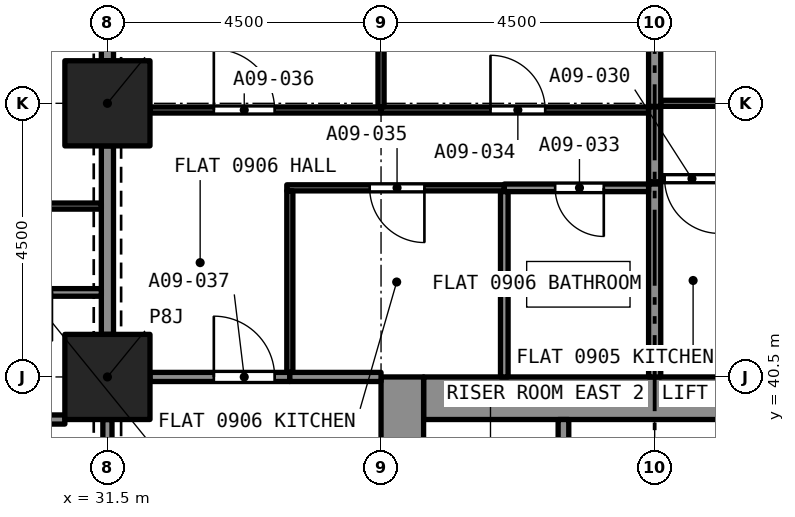
"""IFC4 building model, lengths in metres.
Left out: names, types, materials, properties, quantities, classifications, styles, units other than length and angle.
Written with IfcOpenShell. Run it as: python <this file> out.ifc"""

import sys

from ifc_helpers import new_model, si_unit, direction, frame, frame_2d, origin, origin_2d, place, context, subcontext, project, spatial, rectangle, extrude, element, fill, save


model = new_model("IFC4")
c1 = context("Model", 3, precision=1e-05, world=origin(), true_north=direction((0.0, 1.0)))
c2 = subcontext(c1, "Body", "Model", "MODEL_VIEW")
j1 = project(units=[si_unit("LENGTHUNIT", "METRE"), si_unit("PLANEANGLEUNIT", "RADIAN")], contexts=[c1])
p1 = place(None, origin())
s1 = spatial("IfcSite", under=j1, at=p1, CompositionType="ELEMENT")
p2 = place(p1, origin())
s2 = spatial("IfcBuilding", under=s1, at=p2, CompositionType="ELEMENT")
p3 = place(p2, frame((0.0, 0.0, 40.0)))
s3 = spatial("IfcBuildingStorey", under=s2, at=p3, CompositionType="ELEMENT", Elevation=40.0)
for number, where, z_axis, x_axis in (
    (1, (31.5, 40.5, 0.0), (0.0, 0.0, 1.0), (1.0, 0.0, 0.0)),
    (2, (31.5, 45.0, 0.0), (0.0, 0.0, 1.0), (1.0, 0.0, 0.0)),
):
    element("IfcColumn", number, at=place(p3, frame(where, z_axis=z_axis, x_axis=x_axis)), inside=s3, PredefinedType="COLUMN", context=c2, shape_type="SweptSolid", body=[
        extrude(rectangle(XDim=1.4, YDim=1.4, at=origin_2d()), origin(), (0.0, 0.0, 1.0), 3.2),
    ])
p4 = place(p3, frame((36.7, 40.15, 0.0), z_axis=(0.0, 0.0, 1.0), x_axis=(1.0, 0.0, 0.0)))
e3 = element("IfcWall", 3, at=p4, inside=s3, PredefinedType="SOLIDWALL", context=c2, shape_type="SweptSolid", body=[
    extrude(rectangle(XDim=7.6, YDim=0.7, at=frame_2d((3.8, 0.0))), origin(), (0.0, 0.0, 1.0), 3.2),
])
p5 = place(p3, frame((36.35, 27.0, 0.0), z_axis=(0.0, 0.0, 1.0), x_axis=(0.0, 1.0, 0.0)))
e4 = element("IfcWall", 4, at=p5, inside=s3, PredefinedType="SOLIDWALL", context=c2, shape_type="SweptSolid", body=[
    extrude(rectangle(XDim=13.5, YDim=0.7, at=frame_2d((6.75, 0.0))), origin(), (0.0, 0.0, 1.0), 3.2),
])
p6 = place(p5, frame((8.95, 0.0, 0.0)))
e5 = element("IfcOpeningElement", 5, at=p6, cuts=e4, PredefinedType="OPENING", context=c2, shape_type="SweptSolid", body=[
    extrude(rectangle(XDim=1.2, YDim=2.1, at=frame_2d((0.6, 1.05))), frame((0.0, 0.36, 0.0), z_axis=(0.0, -1.0, 0.0), x_axis=(1.0, 0.0, 0.0)), (0.0, 0.0, 1.0), 0.72),
])
p7 = place(p3, frame((40.6, 45.0, 0.0), z_axis=(0.0, 0.0, 1.0), x_axis=(1.0, 0.0, 0.0)))
e6 = element("IfcWall", 6, at=p7, inside=s3, PredefinedType="PARTITIONING", context=c2, shape_type="SweptSolid", body=[
    extrude(rectangle(XDim=4.4, YDim=0.1, at=frame_2d((2.2, 0.0))), origin(), (0.0, 0.0, 1.0), 2.9),
])
p8 = place(p7, frame((1.7, 0.0, 0.0)))
e7 = element("IfcOpeningElement", 7, at=p8, cuts=e6, PredefinedType="OPENING", context=c2, shape_type="SweptSolid", body=[
    extrude(rectangle(XDim=0.9, YDim=2.1, at=frame_2d((0.45, 1.05))), frame((0.0, 0.06, 0.0), z_axis=(0.0, -1.0, 0.0), x_axis=(1.0, 0.0, 0.0)), (0.0, 0.0, 1.0), 0.12),
])
p9 = place(p3, frame((40.5, 44.95, 0.0), z_axis=(0.0, 0.0, 1.0), x_axis=(0.0, 1.0, 0.0)))
e8 = element("IfcWall", 8, at=p9, inside=s3, PredefinedType="PARTITIONING", context=c2, shape_type="SweptSolid", body=[
    extrude(rectangle(XDim=3.85, YDim=0.2, at=frame_2d((1.925, 0.0))), origin(), (0.0, 0.0, 1.0), 2.9),
])
p10 = place(p3, frame((41.727, 43.76, 0.0), z_axis=(0.0, 0.0, 1.0), x_axis=(-1.0, 0.0, 0.0)))
e9 = element("IfcWall", 9, at=p10, inside=s3, PredefinedType="PARTITIONING", context=c2, shape_type="SweptSolid", body=[
    extrude(rectangle(XDim=1.127, YDim=0.1, at=frame_2d((0.563, 0.0))), origin(), (0.0, 0.0, 1.0), 2.9),
])
p11 = place(p10, frame((0.164, 0.0, 0.0)))
e10 = element("IfcOpeningElement", 10, at=p11, cuts=e9, PredefinedType="OPENING", context=c2, shape_type="SweptSolid", body=[
    extrude(rectangle(XDim=0.9, YDim=2.1, at=frame_2d((0.45, 1.05))), frame((0.0, 0.06, 0.0), z_axis=(0.0, -1.0, 0.0), x_axis=(1.0, 0.0, 0.0)), (0.0, 0.0, 1.0), 0.12),
])
p12 = place(p3, frame((40.5, 43.71, 0.0), z_axis=(0.0, 0.0, 1.0), x_axis=(0.0, 1.0, 0.0)))
e11 = element("IfcWall", 11, at=p12, inside=s3, PredefinedType="PARTITIONING", context=c2, shape_type="SweptSolid", body=[
    extrude(rectangle(XDim=1.23, YDim=0.2, at=frame_2d((0.615, 0.0))), origin(), (0.0, 0.0, 1.0), 2.9),
])
p13 = place(p3, frame((40.5, 40.5, 0.0), z_axis=(0.0, 0.0, 1.0), x_axis=(0.0, 1.0, 0.0)))
e12 = element("IfcWall", 12, at=p13, inside=s3, PredefinedType="PARTITIONING", context=c2, shape_type="SweptSolid", body=[
    extrude(rectangle(XDim=3.173, YDim=0.2, at=frame_2d((1.586, 0.0))), origin(), (0.0, 0.0, 1.0), 2.9),
])
p14 = place(p3, frame((40.4, 43.61, 0.0), z_axis=(0.0, 0.0, 1.0), x_axis=(-1.0, 0.0, 0.0)))
e13 = element("IfcWall", 13, at=p14, inside=s3, PredefinedType="PARTITIONING", context=c2, shape_type="SweptSolid", body=[
    extrude(rectangle(XDim=2.373, YDim=0.125, at=frame_2d((1.187, 0.0))), origin(), (0.0, 0.0, 1.0), 2.9),
])
p15 = place(p14, frame((0.737, 0.0, 0.0)))
e14 = element("IfcOpeningElement", 14, at=p15, cuts=e13, PredefinedType="OPENING", context=c2, shape_type="SweptSolid", body=[
    extrude(rectangle(XDim=0.8, YDim=2.1, at=frame_2d((0.4, 1.05))), frame((0.0, 0.073, 0.0), z_axis=(0.0, -1.0, 0.0), x_axis=(1.0, 0.0, 0.0)), (0.0, 0.0, 1.0), 0.145),
])
p16 = place(p3, frame((38.027, 40.5, 0.0), z_axis=(0.0, 0.0, 1.0), x_axis=(0.0, 1.0, 0.0)))
e15 = element("IfcWall", 15, at=p16, inside=s3, PredefinedType="PARTITIONING", context=c2, shape_type="SweptSolid", body=[
    extrude(rectangle(XDim=3.048, YDim=0.125, at=frame_2d((1.524, 0.0))), origin(), (0.0, 0.0, 1.0), 2.9),
])
p17 = place(p3, frame((36.0, 44.89, 0.0), z_axis=(0.0, 0.0, 1.0), x_axis=(1.0, 0.0, 0.0)))
e16 = element("IfcWall", 16, at=p17, inside=s3, PredefinedType="PARTITIONING", context=c2, shape_type="SweptSolid", body=[
    extrude(rectangle(XDim=4.4, YDim=0.1, at=frame_2d((2.2, 0.0))), origin(), (0.0, 0.0, 1.0), 2.9),
])
p18 = place(p17, frame((1.8, 0.0, 0.0)))
e17 = element("IfcOpeningElement", 17, at=p18, cuts=e16, PredefinedType="OPENING", context=c2, shape_type="SweptSolid", body=[
    extrude(rectangle(XDim=0.9, YDim=2.1, at=frame_2d((0.45, 1.05))), frame((0.0, 0.06, 0.0), z_axis=(0.0, -1.0, 0.0), x_axis=(1.0, 0.0, 0.0)), (0.0, 0.0, 1.0), 0.12),
])
p19 = place(p3, frame((36.0, 44.94, 0.0), z_axis=(0.0, 0.0, 1.0), x_axis=(0.0, 1.0, 0.0)))
e18 = element("IfcWall", 18, at=p19, inside=s3, PredefinedType="PARTITIONING", context=c2, shape_type="SweptSolid", body=[
    extrude(rectangle(XDim=3.86, YDim=0.1, at=frame_2d((1.93, 0.0))), origin(), (0.0, 0.0, 1.0), 2.9),
])
p20 = place(p3, frame((38.027, 43.61, 0.0), z_axis=(0.0, 0.0, 1.0), x_axis=(-1.0, 0.0, 0.0)))
e19 = element("IfcWall", 19, at=p20, inside=s3, PredefinedType="PARTITIONING", context=c2, shape_type="SweptSolid", body=[
    extrude(rectangle(XDim=3.577, YDim=0.1, at=frame_2d((1.788, 0.0))), origin(), (0.0, 0.0, 1.0), 2.9),
])
p21 = place(p20, frame((1.313, 0.0, 0.0)))
e20 = element("IfcOpeningElement", 20, at=p21, cuts=e19, PredefinedType="OPENING", context=c2, shape_type="SweptSolid", body=[
    extrude(rectangle(XDim=0.9, YDim=2.1, at=frame_2d((0.45, 1.05))), frame((0.0, 0.06, 0.0), z_axis=(0.0, -1.0, 0.0), x_axis=(1.0, 0.0, 0.0)), (0.0, 0.0, 1.0), 0.12),
])
p22 = place(p3, frame((34.5, 40.575, 0.0), z_axis=(0.0, 0.0, 1.0), x_axis=(0.0, 1.0, 0.0)))
e21 = element("IfcWall", 21, at=p22, inside=s3, PredefinedType="PARTITIONING", context=c2, shape_type="SweptSolid", body=[
    extrude(rectangle(XDim=2.985, YDim=0.1, at=frame_2d((1.493, 0.0))), origin(), (0.0, 0.0, 1.0), 2.9),
])
p23 = place(p3, frame((32.2, 44.89, 0.0), z_axis=(0.0, 0.0, 1.0), x_axis=(1.0, 0.0, 0.0)))
e22 = element("IfcWall", 22, at=p23, inside=s3, PredefinedType="PARTITIONING", context=c2, shape_type="SweptSolid", body=[
    extrude(rectangle(XDim=3.8, YDim=0.1, at=frame_2d((1.9, 0.0))), origin(), (0.0, 0.0, 1.0), 2.9),
])
p24 = place(p23, frame((1.05, 0.0, 0.0)))
e23 = element("IfcOpeningElement", 23, at=p24, cuts=e22, PredefinedType="OPENING", context=c2, shape_type="SweptSolid", body=[
    extrude(rectangle(XDim=1.0, YDim=2.1, at=frame_2d((0.5, 1.05))), frame((0.0, 0.06, 0.0), z_axis=(0.0, -1.0, 0.0), x_axis=(1.0, 0.0, 0.0)), (0.0, 0.0, 1.0), 0.12),
])
p25 = place(p3, frame((31.5, 41.2, 0.0), z_axis=(0.0, 0.0, 1.0), x_axis=(0.0, 1.0, 0.0)))
e24 = element("IfcWall", 24, at=p25, inside=s3, PredefinedType="PARTITIONING", context=c2, shape_type="SweptSolid", body=[
    extrude(rectangle(XDim=3.1, YDim=0.2, at=frame_2d((1.55, 0.0))), origin(), (0.0, 0.0, 1.0), 2.38),
])
p26 = place(p3, frame((32.2, 40.5, 0.0), z_axis=(0.0, 0.0, 1.0), x_axis=(1.0, 0.0, 0.0)))
e25 = element("IfcWall", 25, at=p26, inside=s3, PredefinedType="PARTITIONING", context=c2, shape_type="SweptSolid", body=[
    extrude(rectangle(XDim=2.3, YDim=0.15, at=frame_2d((1.15, 0.0))), origin(), (0.0, 0.0, 1.0), 2.9),
])
p27 = place(p26, frame((1.05, 0.0, 0.0)))
e26 = element("IfcOpeningElement", 26, at=p27, cuts=e25, PredefinedType="OPENING", context=c2, shape_type="SweptSolid", body=[
    extrude(rectangle(XDim=1.0, YDim=2.1, at=frame_2d((0.5, 1.05))), frame((0.0, 0.085, 0.0), z_axis=(0.0, -1.0, 0.0), x_axis=(1.0, 0.0, 0.0)), (0.0, 0.0, 1.0), 0.17),
])
p28 = place(p3, frame((34.5, 40.5, 0.0), z_axis=(0.0, 0.0, 1.0), x_axis=(1.0, 0.0, 0.0)))
e27 = element("IfcWall", 27, at=p28, inside=s3, PredefinedType="PARTITIONING", context=c2, shape_type="SweptSolid", body=[
    extrude(rectangle(XDim=1.5, YDim=0.15, at=frame_2d((0.75, 0.0))), origin(), (0.0, 0.0, 1.0), 2.9),
])
p29 = place(p3, frame((31.5, 45.7, 0.0), z_axis=(0.0, 0.0, 1.0), x_axis=(0.0, 1.0, 0.0)))
e28 = element("IfcWall", 28, at=p29, inside=s3, PredefinedType="PARTITIONING", context=c2, shape_type="SweptSolid", body=[
    extrude(rectangle(XDim=3.1, YDim=0.2, at=frame_2d((1.55, 0.0))), origin(), (0.0, 0.0, 1.0), 2.38),
])
p30 = place(p3, frame((31.4, 41.89, 0.0), z_axis=(0.0, 0.0, 1.0), x_axis=(-1.0, 0.0, 0.0)))
e29 = element("IfcWall", 29, at=p30, inside=s3, PredefinedType="PARTITIONING", context=c2, shape_type="SweptSolid", body=[
    extrude(rectangle(XDim=2.587, YDim=0.125, at=frame_2d((1.294, 0.0))), origin(), (0.0, 0.0, 1.0), 2.75),
])
p31 = place(p30, frame((0.812, 0.0, 0.0)))
e30 = element("IfcOpeningElement", 30, at=p31, cuts=e29, PredefinedType="OPENING", context=c2, shape_type="SweptSolid", body=[
    extrude(rectangle(XDim=0.8, YDim=2.1, at=frame_2d((0.4, 1.05))), frame((0.0, 0.073, 0.0), z_axis=(0.0, -1.0, 0.0), x_axis=(1.0, 0.0, 0.0)), (0.0, 0.0, 1.0), 0.145),
])
p32 = place(p3, frame((28.875, 39.8, 0.0), z_axis=(0.0, 0.0, 1.0), x_axis=(1.0, 0.0, 0.0)))
e31 = element("IfcWall", 31, at=p32, inside=s3, PredefinedType="PARTITIONING", context=c2, shape_type="SweptSolid", body=[
    extrude(rectangle(XDim=1.925, YDim=0.15, at=frame_2d((0.962, 0.0))), origin(), (0.0, 0.0, 1.0), 2.75),
])
p33 = place(p3, frame((27.0, 43.31, 0.0), z_axis=(0.0, 0.0, 1.0), x_axis=(1.0, 0.0, 0.0)))
e32 = element("IfcWall", 32, at=p33, inside=s3, PredefinedType="PARTITIONING", context=c2, shape_type="SweptSolid", body=[
    extrude(rectangle(XDim=4.4, YDim=0.1, at=frame_2d((2.2, 0.0))), origin(), (0.0, 0.0, 1.0), 2.75),
])
p34 = place(p33, frame((1.8, 0.0, 0.0)))
e33 = element("IfcOpeningElement", 33, at=p34, cuts=e32, PredefinedType="OPENING", context=c2, shape_type="SweptSolid", body=[
    extrude(rectangle(XDim=0.9, YDim=2.1, at=frame_2d((0.45, 1.05))), frame((0.0, 0.06, 0.0), z_axis=(0.0, -1.0, 0.0), x_axis=(1.0, 0.0, 0.0)), (0.0, 0.0, 1.0), 0.12),
])
p35 = place(p3, frame((31.5, 36.7, 0.0), z_axis=(0.0, 0.0, 1.0), x_axis=(0.0, 1.0, 0.0)))
e34 = element("IfcWall", 34, at=p35, inside=s3, PredefinedType="PARTITIONING", context=c2, shape_type="SweptSolid", body=[
    extrude(rectangle(XDim=3.1, YDim=0.15, at=frame_2d((1.55, 0.0))), origin(), (0.0, 0.0, 1.0), 2.38),
])
p36 = place(p35, frame((0.95, 0.0, 0.0)))
e35 = element("IfcOpeningElement", 35, at=p36, cuts=e34, PredefinedType="OPENING", context=c2, shape_type="SweptSolid", body=[
    extrude(rectangle(XDim=1.2, YDim=2.1, at=frame_2d((0.6, 1.05))), frame((0.0, 0.085, 0.0), z_axis=(0.0, -1.0, 0.0), x_axis=(1.0, 0.0, 0.0)), (0.0, 0.0, 1.0), 0.17),
])
p37 = place(p3, frame((39.0, 37.5, 0.0), z_axis=(0.0, 0.0, 1.0), x_axis=(0.0, 1.0, 0.0)))
e36 = element("IfcWall", 36, at=p37, inside=s3, PredefinedType="SOLIDWALL", context=c2, shape_type="SweptSolid", body=[
    extrude(rectangle(XDim=2.3, YDim=0.175, at=frame_2d((1.15, 0.0))), origin(), (0.0, 0.0, 1.0), 2.9),
])
p38 = place(p11, origin())
e37 = element("IfcDoor", 37, at=p38, inside=s3, OperationType="SINGLE_SWING_RIGHT", PredefinedType="DOOR", context=c2, shape_type="SweptSolid", body=[
    extrude(rectangle(XDim=0.9, YDim=2.1, at=frame_2d((0.45, 1.05))), frame((0.0, 0.025, 0.0), z_axis=(0.0, -1.0, 0.0), x_axis=(1.0, 0.0, 0.0)), (0.0, 0.0, 1.0), 0.05),
])
fill(e10, e37)
p39 = place(p15, origin())
e38 = element("IfcDoor", 38, at=p39, inside=s3, OperationType="SINGLE_SWING_LEFT", PredefinedType="DOOR", context=c2, shape_type="SweptSolid", body=[
    extrude(rectangle(XDim=0.8, YDim=2.1, at=frame_2d((0.4, 1.05))), frame((0.0, 0.025, 0.0), z_axis=(0.0, -1.0, 0.0), x_axis=(1.0, 0.0, 0.0)), (0.0, 0.0, 1.0), 0.05),
])
fill(e14, e38)
p40 = place(p18, origin())
e39 = element("IfcDoor", 39, at=p40, inside=s3, OperationType="SINGLE_SWING_RIGHT", PredefinedType="DOOR", context=c2, shape_type="SweptSolid", body=[
    extrude(rectangle(XDim=0.9, YDim=2.1, at=frame_2d((0.45, 1.05))), frame((0.0, 0.025, 0.0), z_axis=(0.0, -1.0, 0.0), x_axis=(1.0, 0.0, 0.0)), (0.0, 0.0, 1.0), 0.05),
])
fill(e17, e39)
p41 = place(p21, origin())
e40 = element("IfcDoor", 40, at=p41, inside=s3, OperationType="SINGLE_SWING_LEFT", PredefinedType="DOOR", context=c2, shape_type="SweptSolid", body=[
    extrude(rectangle(XDim=0.9, YDim=2.1, at=frame_2d((0.45, 1.05))), frame((0.0, 0.025, 0.0), z_axis=(0.0, -1.0, 0.0), x_axis=(1.0, 0.0, 0.0)), (0.0, 0.0, 1.0), 0.05),
])
fill(e20, e40)
p42 = place(p24, origin())
e41 = element("IfcDoor", 41, at=p42, inside=s3, OperationType="SINGLE_SWING_LEFT", PredefinedType="DOOR", context=c2, shape_type="SweptSolid", body=[
    extrude(rectangle(XDim=1.0, YDim=2.1, at=frame_2d((0.5, 1.05))), frame((0.0, 0.025, 0.0), z_axis=(0.0, -1.0, 0.0), x_axis=(1.0, 0.0, 0.0)), (0.0, 0.0, 1.0), 0.05),
])
fill(e23, e41)
p43 = place(p27, origin())
e42 = element("IfcDoor", 42, at=p43, inside=s3, OperationType="SINGLE_SWING_RIGHT", PredefinedType="DOOR", context=c2, shape_type="SweptSolid", body=[
    extrude(rectangle(XDim=1.0, YDim=2.1, at=frame_2d((0.5, 1.05))), frame((0.0, 0.025, 0.0), z_axis=(0.0, -1.0, 0.0), x_axis=(1.0, 0.0, 0.0)), (0.0, 0.0, 1.0), 0.05),
])
fill(e26, e42)
save(model, sys.argv[1])
